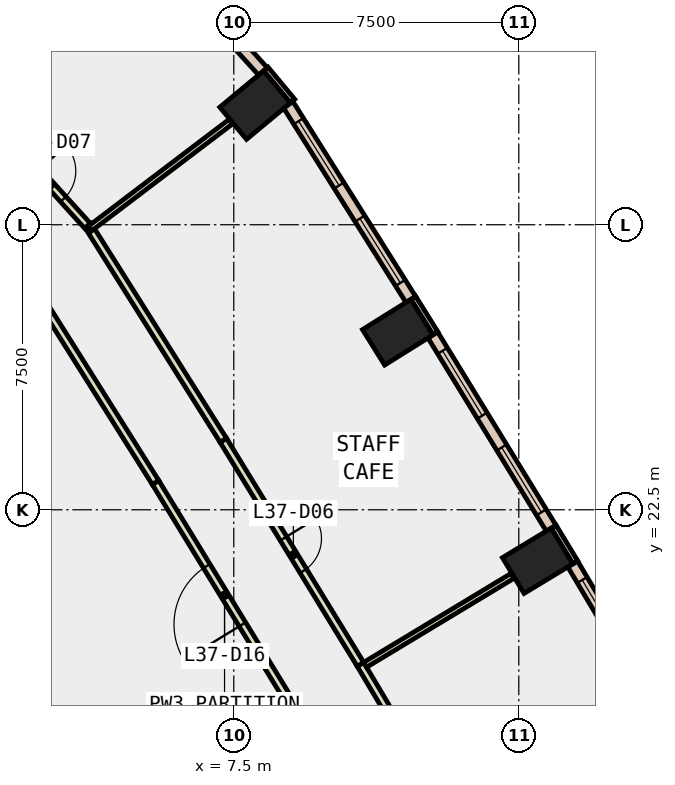
"""IFC4 building model, lengths in metres.
Left out: names, types, materials, properties, quantities, classifications, styles, units other than length and angle.
Written with IfcOpenShell. Run it as: python <this file> out.ifc"""

import sys

from ifc_helpers import new_model, si_unit, direction, frame, frame_2d, origin, origin_2d, place, context, subcontext, project, spatial, rectangle, extrude, element, fill, save


model = new_model("IFC4")
c1 = context("Model", 3, precision=1e-05, world=origin(), true_north=direction((0.0, 1.0)))
c2 = subcontext(c1, "Body", "Model", "MODEL_VIEW")
j1 = project(units=[si_unit("LENGTHUNIT", "METRE"), si_unit("PLANEANGLEUNIT", "RADIAN")], contexts=[c1])
p1 = place(None, origin())
s1 = spatial("IfcSite", under=j1, at=p1, CompositionType="ELEMENT")
p2 = place(p1, origin())
s2 = spatial("IfcBuilding", under=s1, at=p2, CompositionType="ELEMENT")
p3 = place(p2, frame((0.0, 0.0, 167.6)))
s3 = spatial("IfcBuildingStorey", under=s2, at=p3, CompositionType="ELEMENT", Elevation=167.6)
for number, where, z_axis, x_axis in (
    (1, (15.496, 21.158, -0.4), (0.0, 0.0, 1.0), (-0.518, 0.855, 0.0)),
    (2, (11.815, 27.172, -0.4), (0.0, 0.0, 1.0), (-0.53, 0.848, 0.0)),
    (3, (8.061, 33.149, -0.4), (0.0, 0.0, 1.0), (-0.639, 0.769, 0.0)),
):
    element("IfcColumn", number, at=place(p3, frame(where, z_axis=z_axis, x_axis=x_axis)), inside=s3, PredefinedType="COLUMN", context=c2, shape_type="SweptSolid", body=[
        extrude(rectangle(XDim=1.1, YDim=1.5, at=origin_2d()), origin(), (0.0, 0.0, 1.0), 4.2),
    ])
for number, where, z_axis, x_axis in (
    (4, (16.487, 21.115, 0.0), (0.0, 0.0, 1.0), (-0.518, 0.855, 0.0)),
    (5, (12.806, 27.143, 0.0), (0.0, 0.0, 1.0), (-0.53, 0.848, 0.0)),
    (6, (9.047, 33.253, 0.0), (0.0, 0.0, 1.0), (-0.639, 0.769, 0.0)),
):
    element("IfcWall", number, at=place(p3, frame(where, z_axis=z_axis, x_axis=x_axis)), inside=s3, PredefinedType="STANDARD", context=c2, shape_type="SweptSolid", body=[
        extrude(rectangle(XDim=1.1, YDim=0.15, at=frame_2d((0.55, 0.0))), origin(), (0.0, 0.0, 1.0), 3.8),
    ])
p4 = place(p3, frame((19.465, 15.949, 0.0), z_axis=(0.0, 0.0, 1.0), x_axis=(-0.511053317394, 0.8595490136, 0.0)))
e7 = element("IfcWall", 7, at=p4, inside=s3, PredefinedType="STANDARD", context=c2, shape_type="SweptSolid", body=[
    extrude(rectangle(XDim=5.962, YDim=0.3, at=frame_2d((2.981, 0.0))), origin(), (0.0, 0.0, 1.0), 3.8),
])
p5 = place(p4, frame((0.491, 0.0, 0.9)))
e8 = element("IfcOpeningElement", 8, at=p5, cuts=e7, PredefinedType="OPENING", context=c2, shape_type="SweptSolid", body=[
    extrude(rectangle(XDim=2.0, YDim=2.6, at=frame_2d((1.0, 1.3))), frame((0.0, 0.16, 0.0), z_axis=(0.0, -1.0, 0.0), x_axis=(1.0, 0.0, 0.0)), (0.0, 0.0, 1.0), 0.32),
])
p6 = place(p4, frame((3.472, 0.0, 0.9)))
e9 = element("IfcOpeningElement", 9, at=p6, cuts=e7, PredefinedType="OPENING", context=c2, shape_type="SweptSolid", body=[
    extrude(rectangle(XDim=2.0, YDim=2.6, at=frame_2d((1.0, 1.3))), frame((0.0, 0.16, 0.0), z_axis=(0.0, -1.0, 0.0), x_axis=(1.0, 0.0, 0.0)), (0.0, 0.0, 1.0), 0.32),
])
p7 = place(p3, frame((15.851, 22.015, 0.0), z_axis=(0.0, 0.0, 1.0), x_axis=(-0.522156898008, 0.852849443842, 0.0)))
e10 = element("IfcWall", 10, at=p7, inside=s3, PredefinedType="STANDARD", context=c2, shape_type="SweptSolid", body=[
    extrude(rectangle(XDim=5.964, YDim=0.3, at=frame_2d((2.982, 0.0))), origin(), (0.0, 0.0, 1.0), 3.8),
])
p8 = place(p7, frame((0.491, 0.0, 0.9)))
e11 = element("IfcOpeningElement", 11, at=p8, cuts=e10, PredefinedType="OPENING", context=c2, shape_type="SweptSolid", body=[
    extrude(rectangle(XDim=2.0, YDim=2.6, at=frame_2d((1.0, 1.3))), frame((0.0, 0.16, 0.0), z_axis=(0.0, -1.0, 0.0), x_axis=(1.0, 0.0, 0.0)), (0.0, 0.0, 1.0), 0.32),
])
p9 = place(p7, frame((3.473, 0.0, 0.9)))
e12 = element("IfcOpeningElement", 12, at=p9, cuts=e10, PredefinedType="OPENING", context=c2, shape_type="SweptSolid", body=[
    extrude(rectangle(XDim=2.0, YDim=2.6, at=frame_2d((1.0, 1.3))), frame((0.0, 0.16, 0.0), z_axis=(0.0, -1.0, 0.0), x_axis=(1.0, 0.0, 0.0)), (0.0, 0.0, 1.0), 0.32),
])
p10 = place(p3, frame((12.158, 28.034, 0.0), z_axis=(0.0, 0.0, 1.0), x_axis=(-0.532721310512, 0.846290733334, 0.0)))
e13 = element("IfcWall", 13, at=p10, inside=s3, PredefinedType="STANDARD", context=c2, shape_type="SweptSolid", body=[
    extrude(rectangle(XDim=6.056, YDim=0.3, at=frame_2d((3.028, 0.0))), origin(), (0.0, 0.0, 1.0), 3.8),
])
p11 = place(p10, frame((0.514, 0.0, 0.9)))
e14 = element("IfcOpeningElement", 14, at=p11, cuts=e13, PredefinedType="OPENING", context=c2, shape_type="SweptSolid", body=[
    extrude(rectangle(XDim=2.0, YDim=2.6, at=frame_2d((1.0, 1.3))), frame((0.0, 0.16, 0.0), z_axis=(0.0, -1.0, 0.0), x_axis=(1.0, 0.0, 0.0)), (0.0, 0.0, 1.0), 0.32),
])
p12 = place(p10, frame((3.542, 0.0, 0.9)))
e15 = element("IfcOpeningElement", 15, at=p12, cuts=e13, PredefinedType="OPENING", context=c2, shape_type="SweptSolid", body=[
    extrude(rectangle(XDim=2.0, YDim=2.6, at=frame_2d((1.0, 1.3))), frame((0.0, 0.16, 0.0), z_axis=(0.0, -1.0, 0.0), x_axis=(1.0, 0.0, 0.0)), (0.0, 0.0, 1.0), 0.32),
])
p13 = place(p3, frame((8.268, 34.035, 0.0), z_axis=(0.0, 0.0, 1.0), x_axis=(-0.672034341329, 0.740519982225, 0.0)))
e16 = element("IfcWall", 16, at=p13, inside=s3, PredefinedType="STANDARD", context=c2, shape_type="SweptSolid", body=[
    extrude(rectangle(XDim=4.018, YDim=0.3, at=frame_2d((2.009, 0.0))), origin(), (0.0, 0.0, 1.0), 3.8),
])
p14 = place(p13, frame((1.309, 0.0, 0.9)))
e17 = element("IfcOpeningElement", 17, at=p14, cuts=e16, PredefinedType="OPENING", context=c2, shape_type="SweptSolid", body=[
    extrude(rectangle(XDim=1.4, YDim=2.6, at=frame_2d((0.7, 1.3))), frame((0.0, 0.16, 0.0), z_axis=(0.0, -1.0, 0.0), x_axis=(1.0, 0.0, 0.0)), (0.0, 0.0, 1.0), 0.32),
])
p15 = place(p3, frame((9.073, 17.285, 0.0), z_axis=(0.0, 0.0, 1.0), x_axis=(-0.522108536257, 0.85287905143, 0.0)))
e18 = element("IfcWall", 18, at=p15, inside=s3, PredefinedType="PARTITIONING", context=c2, shape_type="SweptSolid", body=[
    extrude(rectangle(XDim=6.957, YDim=0.2, at=frame_2d((3.478, 0.0))), origin(), (0.0, 0.0, 1.0), 3.8),
])
p16 = place(p15, frame((2.578, 0.0, 0.0)))
e19 = element("IfcOpeningElement", 19, at=p16, cuts=e18, PredefinedType="OPENING", context=c2, shape_type="SweptSolid", body=[
    extrude(rectangle(XDim=1.8, YDim=2.1, at=frame_2d((0.9, 1.05))), frame((0.0, 0.11, 0.0), z_axis=(0.0, -1.0, 0.0), x_axis=(1.0, 0.0, 0.0)), (0.0, 0.0, 1.0), 0.22),
])
p17 = place(p3, frame((5.441, 23.218, 0.0), z_axis=(0.0, 0.0, 1.0), x_axis=(-0.532786324951, 0.846249804694, 0.0)))
e20 = element("IfcWall", 20, at=p17, inside=s3, PredefinedType="PARTITIONING", context=c2, shape_type="SweptSolid", body=[
    extrude(rectangle(XDim=6.489, YDim=0.2, at=frame_2d((3.244, 0.0))), origin(), (0.0, 0.0, 1.0), 3.8),
])
p18 = place(p3, frame((10.833, 18.434, 0.0), z_axis=(0.0, 0.0, 1.0), x_axis=(0.510975915649, -0.859595028852, 0.0)))
e21 = element("IfcWall", 21, at=p18, inside=s3, PredefinedType="PARTITIONING", context=c2, shape_type="SweptSolid", body=[
    extrude(rectangle(XDim=7.057, YDim=0.2, at=frame_2d((3.528, 0.0))), origin(), (0.0, 0.0, 1.0), 3.8),
])
p19 = place(p18, frame((3.028, 0.0, 0.0)))
e22 = element("IfcOpeningElement", 22, at=p19, cuts=e21, PredefinedType="OPENING", context=c2, shape_type="SweptSolid", body=[
    extrude(rectangle(XDim=1.0, YDim=2.1, at=frame_2d((0.5, 1.05))), frame((0.0, 0.11, 0.0), z_axis=(0.0, -1.0, 0.0), x_axis=(1.0, 0.0, 0.0)), (0.0, 0.0, 1.0), 0.22),
])
p20 = place(p3, frame((3.663, 29.984, 0.0), z_axis=(0.0, 0.0, 1.0), x_axis=(0.532874279134, -0.846194423662, 0.0)))
e23 = element("IfcWall", 23, at=p20, inside=s3, PredefinedType="PARTITIONING", context=c2, shape_type="SweptSolid", body=[
    extrude(rectangle(XDim=6.686, YDim=0.2, at=frame_2d((3.343, 0.0))), origin(), (0.0, 0.0, 1.0), 3.8),
])
p21 = place(p3, frame((7.226, 24.326, 0.0), z_axis=(0.0, 0.0, 1.0), x_axis=(0.52212028524, -0.852871858922, 0.0)))
e24 = element("IfcWall", 24, at=p21, inside=s3, PredefinedType="PARTITIONING", context=c2, shape_type="SweptSolid", body=[
    extrude(rectangle(XDim=6.908, YDim=0.2, at=frame_2d((3.454, 0.0))), origin(), (0.0, 0.0, 1.0), 3.8),
])
p22 = place(p21, frame((3.029, 0.0, 0.0)))
e25 = element("IfcOpeningElement", 25, at=p22, cuts=e24, PredefinedType="OPENING", context=c2, shape_type="SweptSolid", body=[
    extrude(rectangle(XDim=1.0, YDim=2.1, at=frame_2d((0.5, 1.05))), frame((0.0, 0.11, 0.0), z_axis=(0.0, -1.0, 0.0), x_axis=(1.0, 0.0, 0.0)), (0.0, 0.0, 1.0), 0.22),
])
p23 = place(p3, frame((1.708, 32.112, 0.0), z_axis=(0.0, 0.0, 1.0), x_axis=(0.671957285765, -0.740589904135, 0.0)))
e26 = element("IfcWall", 26, at=p23, inside=s3, PredefinedType="PARTITIONING", context=c2, shape_type="SweptSolid", body=[
    extrude(rectangle(XDim=2.888, YDim=0.2, at=frame_2d((1.444, 0.0))), origin(), (0.0, 0.0, 1.0), 3.8),
])
p24 = place(p23, frame((0.944, 0.0, 0.0)))
e27 = element("IfcOpeningElement", 27, at=p24, cuts=e26, PredefinedType="OPENING", context=c2, shape_type="SweptSolid", body=[
    extrude(rectangle(XDim=1.0, YDim=2.1, at=frame_2d((0.5, 1.05))), frame((0.0, 0.11, 0.0), z_axis=(0.0, -1.0, 0.0), x_axis=(1.0, 0.0, 0.0)), (0.0, 0.0, 1.0), 0.22),
])
p25 = place(p3, frame((10.957, 18.421, 0.0), z_axis=(0.0, 0.0, 1.0), x_axis=(0.85624931053, 0.516562792134, 0.0)))
e28 = element("IfcWall", 28, at=p25, inside=s3, PredefinedType="PARTITIONING", context=c2, shape_type="SweptSolid", body=[
    extrude(rectangle(XDim=4.53, YDim=0.15, at=frame_2d((2.265, 0.0))), origin(), (0.0, 0.0, 1.0), 3.8),
])
p26 = place(p3, frame((3.716, 29.899, 0.0), z_axis=(0.0, 0.0, 1.0), x_axis=(0.796435085709, 0.604724031481, 0.0)))
e29 = element("IfcWall", 29, at=p26, inside=s3, PredefinedType="PARTITIONING", context=c2, shape_type="SweptSolid", body=[
    extrude(rectangle(XDim=4.653, YDim=0.15, at=frame_2d((2.327, 0.0))), origin(), (0.0, 0.0, 1.0), 3.8),
])
p27 = place(p6, origin())
e30 = element("IfcWindow", 30, at=p27, inside=s3, PartitioningType="SINGLE_PANEL", PredefinedType="WINDOW", context=c2, shape_type="SweptSolid", body=[
    extrude(rectangle(XDim=2.0, YDim=2.6, at=frame_2d((1.0, 1.3))), frame((0.0, 0.03, 0.0), z_axis=(0.0, -1.0, 0.0), x_axis=(1.0, 0.0, 0.0)), (0.0, 0.0, 1.0), 0.06),
])
fill(e9, e30)
p28 = place(p8, origin())
e31 = element("IfcWindow", 31, at=p28, inside=s3, PartitioningType="SINGLE_PANEL", PredefinedType="WINDOW", context=c2, shape_type="SweptSolid", body=[
    extrude(rectangle(XDim=2.0, YDim=2.6, at=frame_2d((1.0, 1.3))), frame((0.0, 0.03, 0.0), z_axis=(0.0, -1.0, 0.0), x_axis=(1.0, 0.0, 0.0)), (0.0, 0.0, 1.0), 0.06),
])
fill(e11, e31)
p29 = place(p9, origin())
e32 = element("IfcWindow", 32, at=p29, inside=s3, PartitioningType="SINGLE_PANEL", PredefinedType="WINDOW", context=c2, shape_type="SweptSolid", body=[
    extrude(rectangle(XDim=2.0, YDim=2.6, at=frame_2d((1.0, 1.3))), frame((0.0, 0.03, 0.0), z_axis=(0.0, -1.0, 0.0), x_axis=(1.0, 0.0, 0.0)), (0.0, 0.0, 1.0), 0.06),
])
fill(e12, e32)
p30 = place(p11, origin())
e33 = element("IfcWindow", 33, at=p30, inside=s3, PartitioningType="SINGLE_PANEL", PredefinedType="WINDOW", context=c2, shape_type="SweptSolid", body=[
    extrude(rectangle(XDim=2.0, YDim=2.6, at=frame_2d((1.0, 1.3))), frame((0.0, 0.03, 0.0), z_axis=(0.0, -1.0, 0.0), x_axis=(1.0, 0.0, 0.0)), (0.0, 0.0, 1.0), 0.06),
])
fill(e14, e33)
p31 = place(p12, origin())
e34 = element("IfcWindow", 34, at=p31, inside=s3, PartitioningType="SINGLE_PANEL", PredefinedType="WINDOW", context=c2, shape_type="SweptSolid", body=[
    extrude(rectangle(XDim=2.0, YDim=2.6, at=frame_2d((1.0, 1.3))), frame((0.0, 0.03, 0.0), z_axis=(0.0, -1.0, 0.0), x_axis=(1.0, 0.0, 0.0)), (0.0, 0.0, 1.0), 0.06),
])
fill(e15, e34)
p32 = place(p22, origin())
e35 = element("IfcDoor", 35, at=p32, inside=s3, OperationType="SINGLE_SWING_RIGHT", PredefinedType="DOOR", context=c2, shape_type="SweptSolid", body=[
    extrude(rectangle(XDim=1.0, YDim=2.1, at=frame_2d((0.5, 1.05))), frame((0.0, 0.025, 0.0), z_axis=(0.0, -1.0, 0.0), x_axis=(1.0, 0.0, 0.0)), (0.0, 0.0, 1.0), 0.05),
])
fill(e25, e35)
p33 = place(p24, origin())
e36 = element("IfcDoor", 36, at=p33, inside=s3, OperationType="SINGLE_SWING_LEFT", PredefinedType="DOOR", context=c2, shape_type="SweptSolid", body=[
    extrude(rectangle(XDim=1.0, YDim=2.1, at=frame_2d((0.5, 1.05))), frame((0.0, 0.025, 0.0), z_axis=(0.0, -1.0, 0.0), x_axis=(1.0, 0.0, 0.0)), (0.0, 0.0, 1.0), 0.05),
])
fill(e27, e36)
p34 = place(p16, origin())
e37 = element("IfcDoor", 37, at=p34, inside=s3, OperationType="DOUBLE_DOOR_SINGLE_SWING", PredefinedType="DOOR", context=c2, shape_type="SweptSolid", body=[
    extrude(rectangle(XDim=1.8, YDim=2.1, at=frame_2d((0.9, 1.05))), frame((0.0, 0.025, 0.0), z_axis=(0.0, -1.0, 0.0), x_axis=(1.0, 0.0, 0.0)), (0.0, 0.0, 1.0), 0.05),
])
fill(e19, e37)
save(model, sys.argv[1])
